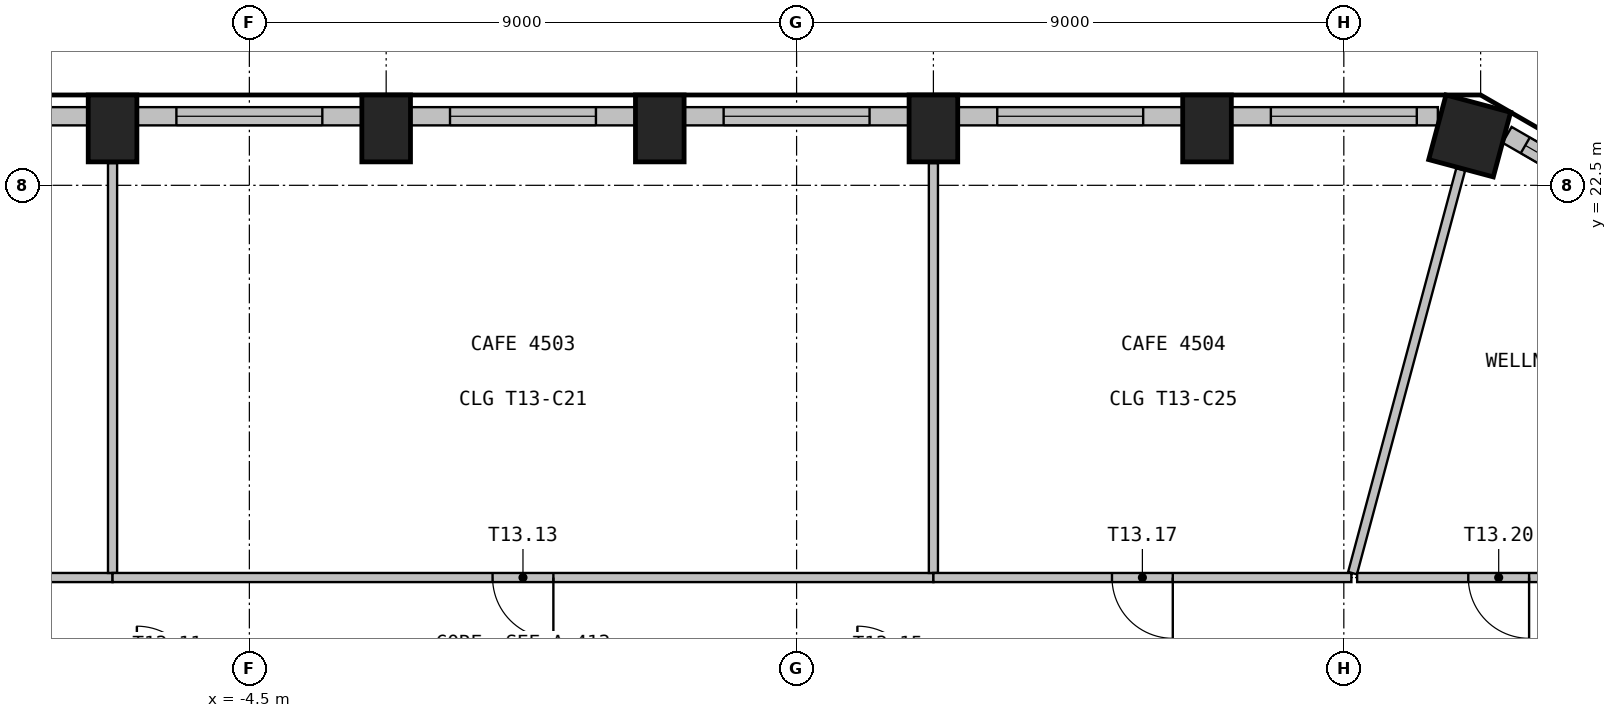
"""IFC4 building model, lengths in metres.
Left out: names, types, materials, properties, quantities, classifications, styles, units other than length and angle.
Written with IfcOpenShell. Run it as: python <this file> out.ifc"""

import sys

from ifc_helpers import new_model, si_unit, direction, frame, frame_2d, origin, origin_2d, place, context, subcontext, project, spatial, rectangle, extrude, element, fill, save


model = new_model("IFC4")
c1 = context("Model", 3, precision=1e-05, world=origin(), true_north=direction((0.0, 1.0)))
c2 = subcontext(c1, "Body", "Model", "MODEL_VIEW")
j1 = project(units=[si_unit("LENGTHUNIT", "METRE"), si_unit("PLANEANGLEUNIT", "RADIAN")], contexts=[c1])
p1 = place(None, origin())
s1 = spatial("IfcSite", under=j1, at=p1, CompositionType="ELEMENT")
p2 = place(p1, origin())
s2 = spatial("IfcBuilding", under=s1, at=p2, CompositionType="ELEMENT")
p3 = place(p2, frame((0.0, 0.0, 183.9)))
s3 = spatial("IfcBuildingStorey", under=s2, at=p3, CompositionType="ELEMENT", Elevation=183.9)
p4 = place(p3, frame((15.57, 23.312, 0.0), z_axis=(0.0, 0.0, 1.0), x_axis=(-0.965925826289, 0.258819045103, 0.0)))
e1 = element("IfcColumn", 1, at=p4, inside=s3, PredefinedType="COLUMN", context=c2, shape_type="SweptSolid", body=[
    extrude(rectangle(XDim=1.1, YDim=1.1, at=origin_2d()), origin(), (0.0, 0.0, 1.0), 3.55),
])
for number, where, z_axis, x_axis in (
    (2, (11.25, 23.436, 0.0), (0.0, 0.0, 1.0), (-1.0, 0.0, 0.0)),
    (3, (6.75, 23.436, 0.0), (0.0, 0.0, 1.0), (-1.0, 0.0, 0.0)),
    (4, (2.25, 23.436, 0.0), (0.0, 0.0, 1.0), (-1.0, 0.0, 0.0)),
    (5, (-2.25, 23.436, 0.0), (0.0, 0.0, 1.0), (-1.0, 0.0, 0.0)),
    (6, (-6.75, 23.436, 0.0), (0.0, 0.0, 1.0), (-1.0, 0.0, 0.0)),
):
    element("IfcColumn", number, at=place(p3, frame(where, z_axis=z_axis, x_axis=x_axis)), inside=s3, PredefinedType="COLUMN", context=c2, shape_type="SweptSolid", body=[
        extrude(rectangle(XDim=0.8, YDim=1.1, at=origin_2d()), origin(), (0.0, 0.0, 1.0), 3.55),
    ])
p5 = place(p3, frame((18.863, 21.784, 0.0), z_axis=(0.0, 0.0, 1.0), x_axis=(-0.865994975416, 0.500052699777, 0.0)))
e7 = element("IfcWall", 7, at=p5, inside=s3, PredefinedType="SOLIDWALL", context=c2, shape_type="SweptSolid", body=[
    extrude(rectangle(XDim=3.093, YDim=0.3, at=frame_2d((1.546, 0.0))), origin(), (0.0, 0.0, 1.0), 3.55),
])
p6 = place(p5, frame((0.346, 0.0, 0.9)))
e8 = element("IfcOpeningElement", 8, at=p6, cuts=e7, PredefinedType="OPENING", context=c2, shape_type="SweptSolid", body=[
    extrude(rectangle(XDim=2.4, YDim=2.1, at=frame_2d((1.2, 1.05))), frame((0.0, 0.16, 0.0), z_axis=(0.0, -1.0, 0.0), x_axis=(1.0, 0.0, 0.0)), (0.0, 0.0, 1.0), 0.32),
])
p7 = place(p3, frame((15.046, 23.635, 0.0), z_axis=(0.0, 0.0, 1.0), x_axis=(-1.0, 0.0, 0.0)))
e9 = element("IfcWall", 9, at=p7, inside=s3, PredefinedType="SOLIDWALL", context=c2, shape_type="SweptSolid", body=[
    extrude(rectangle(XDim=3.396, YDim=0.3, at=frame_2d((1.698, 0.0))), origin(), (0.0, 0.0, 1.0), 3.55),
])
p8 = place(p7, frame((0.346, 0.0, 0.9)))
e10 = element("IfcOpeningElement", 10, at=p8, cuts=e9, PredefinedType="OPENING", context=c2, shape_type="SweptSolid", body=[
    extrude(rectangle(XDim=2.4, YDim=2.1, at=frame_2d((1.2, 1.05))), frame((0.0, 0.16, 0.0), z_axis=(0.0, -1.0, 0.0), x_axis=(1.0, 0.0, 0.0)), (0.0, 0.0, 1.0), 0.32),
])
p9 = place(p3, frame((10.85, 23.635, 0.0), z_axis=(0.0, 0.0, 1.0), x_axis=(-1.0, 0.0, 0.0)))
e11 = element("IfcWall", 11, at=p9, inside=s3, PredefinedType="SOLIDWALL", context=c2, shape_type="SweptSolid", body=[
    extrude(rectangle(XDim=3.699, YDim=0.3, at=frame_2d((1.85, 0.0))), origin(), (0.0, 0.0, 1.0), 3.55),
])
p10 = place(p9, frame((0.649, 0.0, 0.9)))
e12 = element("IfcOpeningElement", 12, at=p10, cuts=e11, PredefinedType="OPENING", context=c2, shape_type="SweptSolid", body=[
    extrude(rectangle(XDim=2.4, YDim=2.1, at=frame_2d((1.2, 1.05))), frame((0.0, 0.16, 0.0), z_axis=(0.0, -1.0, 0.0), x_axis=(1.0, 0.0, 0.0)), (0.0, 0.0, 1.0), 0.32),
])
p11 = place(p3, frame((6.35, 23.635, 0.0), z_axis=(0.0, 0.0, 1.0), x_axis=(-1.0, 0.0, 0.0)))
e13 = element("IfcWall", 13, at=p11, inside=s3, PredefinedType="SOLIDWALL", context=c2, shape_type="SweptSolid", body=[
    extrude(rectangle(XDim=3.699, YDim=0.3, at=frame_2d((1.85, 0.0))), origin(), (0.0, 0.0, 1.0), 3.55),
])
p12 = place(p11, frame((0.649, 0.0, 0.9)))
e14 = element("IfcOpeningElement", 14, at=p12, cuts=e13, PredefinedType="OPENING", context=c2, shape_type="SweptSolid", body=[
    extrude(rectangle(XDim=2.4, YDim=2.1, at=frame_2d((1.2, 1.05))), frame((0.0, 0.16, 0.0), z_axis=(0.0, -1.0, 0.0), x_axis=(1.0, 0.0, 0.0)), (0.0, 0.0, 1.0), 0.32),
])
p13 = place(p3, frame((1.85, 23.635, 0.0), z_axis=(0.0, 0.0, 1.0), x_axis=(-1.0, 0.0, 0.0)))
e15 = element("IfcWall", 15, at=p13, inside=s3, PredefinedType="SOLIDWALL", context=c2, shape_type="SweptSolid", body=[
    extrude(rectangle(XDim=3.699, YDim=0.3, at=frame_2d((1.85, 0.0))), origin(), (0.0, 0.0, 1.0), 3.55),
])
p14 = place(p13, frame((0.649, 0.0, 0.9)))
e16 = element("IfcOpeningElement", 16, at=p14, cuts=e15, PredefinedType="OPENING", context=c2, shape_type="SweptSolid", body=[
    extrude(rectangle(XDim=2.4, YDim=2.1, at=frame_2d((1.2, 1.05))), frame((0.0, 0.16, 0.0), z_axis=(0.0, -1.0, 0.0), x_axis=(1.0, 0.0, 0.0)), (0.0, 0.0, 1.0), 0.32),
])
p15 = place(p3, frame((-2.65, 23.635, 0.0), z_axis=(0.0, 0.0, 1.0), x_axis=(-1.0, 0.0, 0.0)))
e17 = element("IfcWall", 17, at=p15, inside=s3, PredefinedType="SOLIDWALL", context=c2, shape_type="SweptSolid", body=[
    extrude(rectangle(XDim=3.699, YDim=0.3, at=frame_2d((1.85, 0.0))), origin(), (0.0, 0.0, 1.0), 3.55),
])
p16 = place(p15, frame((0.649, 0.0, 0.9)))
e18 = element("IfcOpeningElement", 18, at=p16, cuts=e17, PredefinedType="OPENING", context=c2, shape_type="SweptSolid", body=[
    extrude(rectangle(XDim=2.4, YDim=2.1, at=frame_2d((1.2, 1.05))), frame((0.0, 0.16, 0.0), z_axis=(0.0, -1.0, 0.0), x_axis=(1.0, 0.0, 0.0)), (0.0, 0.0, 1.0), 0.32),
])
p17 = place(p3, frame((-7.15, 23.635, 0.0), z_axis=(0.0, 0.0, 1.0), x_axis=(-1.0, 0.0, 0.0)))
e19 = element("IfcWall", 19, at=p17, inside=s3, PredefinedType="SOLIDWALL", context=c2, shape_type="SweptSolid", body=[
    extrude(rectangle(XDim=3.699, YDim=0.3, at=frame_2d((1.85, 0.0))), origin(), (0.0, 0.0, 1.0), 3.55),
])
p18 = place(p17, frame((0.649, 0.0, 0.9)))
e20 = element("IfcOpeningElement", 20, at=p18, cuts=e19, PredefinedType="OPENING", context=c2, shape_type="SweptSolid", body=[
    extrude(rectangle(XDim=2.4, YDim=2.1, at=frame_2d((1.2, 1.05))), frame((0.0, 0.16, 0.0), z_axis=(0.0, -1.0, 0.0), x_axis=(1.0, 0.0, 0.0)), (0.0, 0.0, 1.0), 0.32),
])
p19 = place(p3, frame((-6.75, 16.05, 0.0), z_axis=(0.0, 0.0, 1.0), x_axis=(-1.0, 0.0, 0.0)))
e21 = element("IfcWall", 21, at=p19, inside=s3, PredefinedType="PARTITIONING", context=c2, shape_type="SweptSolid", body=[
    extrude(rectangle(XDim=6.874, YDim=0.15, at=frame_2d((3.437, 0.0))), origin(), (0.0, 0.0, 1.0), 3.55),
])
p20 = place(p19, frame((2.937, 0.0, 0.0)))
e22 = element("IfcOpeningElement", 22, at=p20, cuts=e21, PredefinedType="OPENING", context=c2, shape_type="SweptSolid", body=[
    extrude(rectangle(XDim=1.0, YDim=2.1, at=frame_2d((0.5, 1.05))), frame((0.0, 0.085, 0.0), z_axis=(0.0, -1.0, 0.0), x_axis=(1.0, 0.0, 0.0)), (0.0, 0.0, 1.0), 0.17),
])
p21 = place(p3, frame((-6.75, 22.865, 0.0), z_axis=(0.0, 0.0, 1.0), x_axis=(0.0, -1.0, 0.0)))
e23 = element("IfcWall", 23, at=p21, inside=s3, PredefinedType="PARTITIONING", context=c2, shape_type="SweptSolid", body=[
    extrude(rectangle(XDim=6.74, YDim=0.15, at=frame_2d((3.37, 0.0))), origin(), (0.0, 0.0, 1.0), 3.55),
])
p22 = place(p3, frame((6.75, 16.05, 0.0), z_axis=(0.0, 0.0, 1.0), x_axis=(-1.0, 0.0, 0.0)))
e24 = element("IfcWall", 24, at=p22, inside=s3, PredefinedType="PARTITIONING", context=c2, shape_type="SweptSolid", body=[
    extrude(rectangle(XDim=13.5, YDim=0.15, at=frame_2d((6.75, 0.0))), origin(), (0.0, 0.0, 1.0), 3.55),
])
p23 = place(p22, frame((6.25, 0.0, 0.0)))
e25 = element("IfcOpeningElement", 25, at=p23, cuts=e24, PredefinedType="OPENING", context=c2, shape_type="SweptSolid", body=[
    extrude(rectangle(XDim=1.0, YDim=2.1, at=frame_2d((0.5, 1.05))), frame((0.0, 0.085, 0.0), z_axis=(0.0, -1.0, 0.0), x_axis=(1.0, 0.0, 0.0)), (0.0, 0.0, 1.0), 0.17),
])
p24 = place(p3, frame((6.75, 22.865, 0.0), z_axis=(0.0, 0.0, 1.0), x_axis=(0.0, -1.0, 0.0)))
e26 = element("IfcWall", 26, at=p24, inside=s3, PredefinedType="PARTITIONING", context=c2, shape_type="SweptSolid", body=[
    extrude(rectangle(XDim=6.74, YDim=0.15, at=frame_2d((3.37, 0.0))), origin(), (0.0, 0.0, 1.0), 3.55),
])
p25 = place(p3, frame((13.624, 16.05, 0.0), z_axis=(0.0, 0.0, 1.0), x_axis=(-1.0, 0.0, 0.0)))
e27 = element("IfcWall", 27, at=p25, inside=s3, PredefinedType="PARTITIONING", context=c2, shape_type="SweptSolid", body=[
    extrude(rectangle(XDim=6.874, YDim=0.15, at=frame_2d((3.437, 0.0))), origin(), (0.0, 0.0, 1.0), 3.55),
])
p26 = place(p25, frame((2.937, 0.0, 0.0)))
e28 = element("IfcOpeningElement", 28, at=p26, cuts=e27, PredefinedType="OPENING", context=c2, shape_type="SweptSolid", body=[
    extrude(rectangle(XDim=1.0, YDim=2.1, at=frame_2d((0.5, 1.05))), frame((0.0, 0.085, 0.0), z_axis=(0.0, -1.0, 0.0), x_axis=(1.0, 0.0, 0.0)), (0.0, 0.0, 1.0), 0.17),
])
p27 = place(p3, frame((15.422, 22.761, 0.0), z_axis=(0.0, 0.0, 1.0), x_axis=(-0.258807697684, -0.965928866749, 0.0)))
e29 = element("IfcWall", 29, at=p27, inside=s3, PredefinedType="PARTITIONING", context=c2, shape_type="SweptSolid", body=[
    extrude(rectangle(XDim=6.873, YDim=0.15, at=frame_2d((3.437, 0.0))), origin(), (0.0, 0.0, 1.0), 3.55),
])
p28 = place(p3, frame((18.375, 16.05, 0.0), z_axis=(0.0, 0.0, 1.0), x_axis=(-1.0, 0.0, 0.0)))
e30 = element("IfcWall", 30, at=p28, inside=s3, PredefinedType="PARTITIONING", context=c2, shape_type="SweptSolid", body=[
    extrude(rectangle(XDim=4.656, YDim=0.15, at=frame_2d((2.328, 0.0))), origin(), (0.0, 0.0, 1.0), 3.55),
])
p29 = place(p28, frame((1.828, 0.0, 0.0)))
e31 = element("IfcOpeningElement", 31, at=p29, cuts=e30, PredefinedType="OPENING", context=c2, shape_type="SweptSolid", body=[
    extrude(rectangle(XDim=1.0, YDim=2.1, at=frame_2d((0.5, 1.05))), frame((0.0, 0.085, 0.0), z_axis=(0.0, -1.0, 0.0), x_axis=(1.0, 0.0, 0.0)), (0.0, 0.0, 1.0), 0.17),
])
p30 = place(p6, origin())
e32 = element("IfcWindow", 32, at=p30, inside=s3, PartitioningType="SINGLE_PANEL", PredefinedType="WINDOW", context=c2, shape_type="SweptSolid", body=[
    extrude(rectangle(XDim=2.4, YDim=2.1, at=frame_2d((1.2, 1.05))), frame((0.0, 0.03, 0.0), z_axis=(0.0, -1.0, 0.0), x_axis=(1.0, 0.0, 0.0)), (0.0, 0.0, 1.0), 0.06),
])
fill(e8, e32)
p31 = place(p8, origin())
e33 = element("IfcWindow", 33, at=p31, inside=s3, PartitioningType="SINGLE_PANEL", PredefinedType="WINDOW", context=c2, shape_type="SweptSolid", body=[
    extrude(rectangle(XDim=2.4, YDim=2.1, at=frame_2d((1.2, 1.05))), frame((0.0, 0.03, 0.0), z_axis=(0.0, -1.0, 0.0), x_axis=(1.0, 0.0, 0.0)), (0.0, 0.0, 1.0), 0.06),
])
fill(e10, e33)
p32 = place(p10, origin())
e34 = element("IfcWindow", 34, at=p32, inside=s3, PartitioningType="SINGLE_PANEL", PredefinedType="WINDOW", context=c2, shape_type="SweptSolid", body=[
    extrude(rectangle(XDim=2.4, YDim=2.1, at=frame_2d((1.2, 1.05))), frame((0.0, 0.03, 0.0), z_axis=(0.0, -1.0, 0.0), x_axis=(1.0, 0.0, 0.0)), (0.0, 0.0, 1.0), 0.06),
])
fill(e12, e34)
p33 = place(p12, origin())
e35 = element("IfcWindow", 35, at=p33, inside=s3, PartitioningType="SINGLE_PANEL", PredefinedType="WINDOW", context=c2, shape_type="SweptSolid", body=[
    extrude(rectangle(XDim=2.4, YDim=2.1, at=frame_2d((1.2, 1.05))), frame((0.0, 0.03, 0.0), z_axis=(0.0, -1.0, 0.0), x_axis=(1.0, 0.0, 0.0)), (0.0, 0.0, 1.0), 0.06),
])
fill(e14, e35)
p34 = place(p14, origin())
e36 = element("IfcWindow", 36, at=p34, inside=s3, PartitioningType="SINGLE_PANEL", PredefinedType="WINDOW", context=c2, shape_type="SweptSolid", body=[
    extrude(rectangle(XDim=2.4, YDim=2.1, at=frame_2d((1.2, 1.05))), frame((0.0, 0.03, 0.0), z_axis=(0.0, -1.0, 0.0), x_axis=(1.0, 0.0, 0.0)), (0.0, 0.0, 1.0), 0.06),
])
fill(e16, e36)
p35 = place(p16, origin())
e37 = element("IfcWindow", 37, at=p35, inside=s3, PartitioningType="SINGLE_PANEL", PredefinedType="WINDOW", context=c2, shape_type="SweptSolid", body=[
    extrude(rectangle(XDim=2.4, YDim=2.1, at=frame_2d((1.2, 1.05))), frame((0.0, 0.03, 0.0), z_axis=(0.0, -1.0, 0.0), x_axis=(1.0, 0.0, 0.0)), (0.0, 0.0, 1.0), 0.06),
])
fill(e18, e37)
p36 = place(p23, origin())
e38 = element("IfcDoor", 38, at=p36, inside=s3, OperationType="SINGLE_SWING_LEFT", PredefinedType="DOOR", context=c2, shape_type="SweptSolid", body=[
    extrude(rectangle(XDim=1.0, YDim=2.1, at=frame_2d((0.5, 1.05))), frame((0.0, 0.025, 0.0), z_axis=(0.0, -1.0, 0.0), x_axis=(1.0, 0.0, 0.0)), (0.0, 0.0, 1.0), 0.05),
])
fill(e25, e38)
p37 = place(p26, origin())
e39 = element("IfcDoor", 39, at=p37, inside=s3, OperationType="SINGLE_SWING_RIGHT", PredefinedType="DOOR", context=c2, shape_type="SweptSolid", body=[
    extrude(rectangle(XDim=1.0, YDim=2.1, at=frame_2d((0.5, 1.05))), frame((0.0, 0.025, 0.0), z_axis=(0.0, -1.0, 0.0), x_axis=(1.0, 0.0, 0.0)), (0.0, 0.0, 1.0), 0.05),
])
fill(e28, e39)
p38 = place(p29, origin())
e40 = element("IfcDoor", 40, at=p38, inside=s3, OperationType="SINGLE_SWING_RIGHT", PredefinedType="DOOR", context=c2, shape_type="SweptSolid", body=[
    extrude(rectangle(XDim=1.0, YDim=2.1, at=frame_2d((0.5, 1.05))), frame((0.0, 0.025, 0.0), z_axis=(0.0, -1.0, 0.0), x_axis=(1.0, 0.0, 0.0)), (0.0, 0.0, 1.0), 0.05),
])
fill(e31, e40)
save(model, sys.argv[1])
